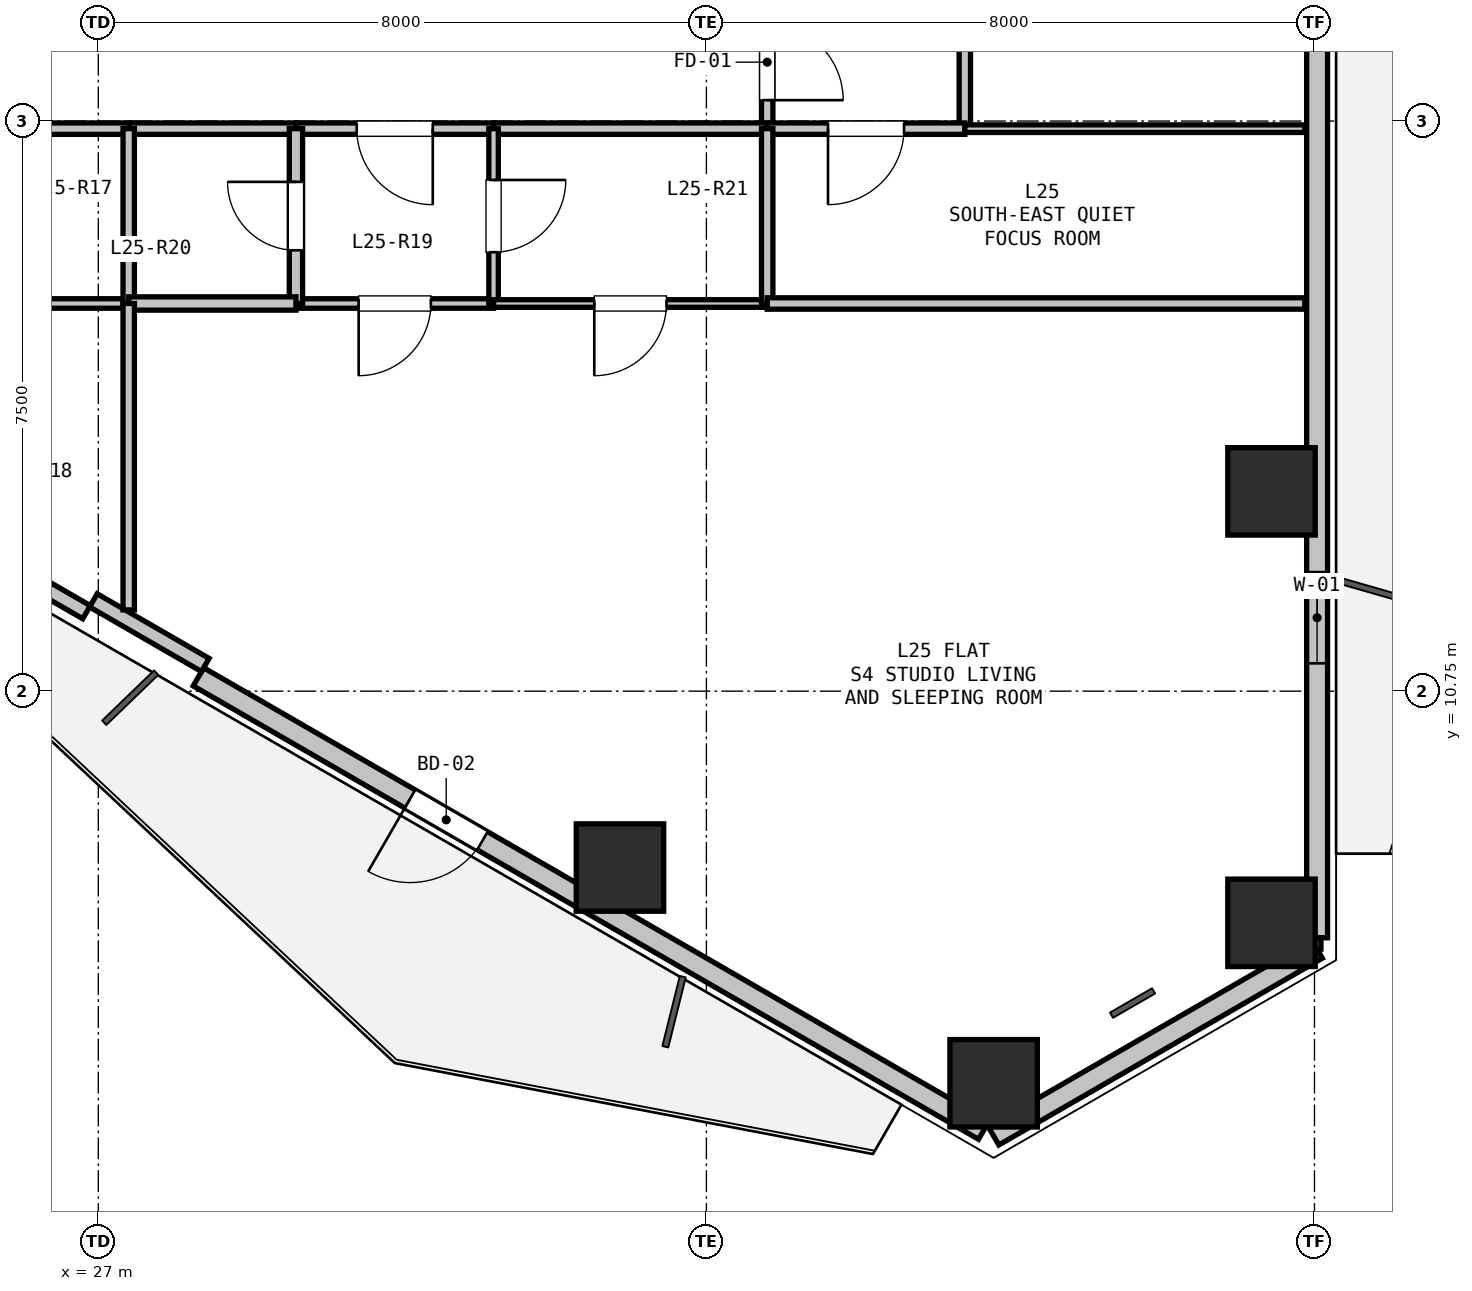
"""IFC4 building model, lengths in metres.
Left out: names, types, materials, properties, quantities, classifications, styles, units other than length and angle.
Written with IfcOpenShell. Run it as: python <this file> out.ifc"""

import sys

from ifc_helpers import new_model, si_unit, direction, frame, frame_2d, origin, origin_2d, place, context, subcontext, project, spatial, rectangle, hollow_rectangle, extrude, element, fill, save


model = new_model("IFC4")
c1 = context("Model", 3, precision=1e-05, world=origin(), true_north=direction((0.0, 1.0)))
c2 = subcontext(c1, "Body", "Model", "MODEL_VIEW")
j1 = project(units=[si_unit("LENGTHUNIT", "METRE"), si_unit("PLANEANGLEUNIT", "RADIAN")], contexts=[c1])
p1 = place(None, origin())
s1 = spatial("IfcSite", under=j1, at=p1, CompositionType="ELEMENT")
p2 = place(p1, origin())
s2 = spatial("IfcBuilding", under=s1, at=p2, CompositionType="ELEMENT")
p3 = place(p2, frame((0.0, 0.0, 93.3)))
s3 = spatial("IfcBuildingStorey", under=s2, at=p3, CompositionType="ELEMENT", Elevation=93.3)
for number, where, z_axis, x_axis in (
    (1, (42.435, 13.378, 0.0), (0.0, 0.0, 1.0), (1.0, 0.0, 0.0)),
    (2, (42.435, 7.702, 0.0), (0.0, 0.0, 1.0), (1.0, 0.0, 0.0)),
    (3, (38.779, 5.591, 0.0), (0.0, 0.0, 1.0), (1.0, 0.0, 0.0)),
    (4, (33.863, 8.429, 0.0), (0.0, 0.0, 1.0), (1.0, 0.0, 0.0)),
):
    element("IfcColumn", number, at=place(p3, frame(where, z_axis=z_axis, x_axis=x_axis)), inside=s3, PredefinedType="COLUMN", context=c2, shape_type="SweptSolid", body=[
        extrude(hollow_rectangle(XDim=1.15, YDim=1.15, WallThickness=0.032, at=origin_2d()), origin(), (0.0, 0.0, 1.0), 3.3),
    ])
p4 = place(p3, frame((43.035, 7.356, 0.0), z_axis=(0.0, 0.0, 1.0), x_axis=(-0.866011848704, -0.500023477353, 0.0)))
e5 = element("IfcWall", 5, at=p4, inside=s3, PredefinedType="SOLIDWALL", context=c2, shape_type="SweptSolid", body=[
    extrude(rectangle(XDim=4.914, YDim=0.275, at=frame_2d((2.457, 0.0))), origin(), (0.0, 0.0, 1.0), 2.67),
])
p5 = place(p3, frame((43.035, 19.435, 0.0), z_axis=(0.0, 0.0, 1.0), x_axis=(0.0, -1.0, 0.0)))
e6 = element("IfcWall", 6, at=p5, inside=s3, PredefinedType="SOLIDWALL", context=c2, shape_type="SweptSolid", body=[
    extrude(rectangle(XDim=11.93, YDim=0.275, at=frame_2d((5.965, 0.0))), origin(), (0.0, 0.0, 1.0), 2.67),
])
p6 = place(p5, frame((7.119, 0.0, 0.9)))
e7 = element("IfcOpeningElement", 7, at=p6, cuts=e6, PredefinedType="OPENING", context=c2, shape_type="SweptSolid", body=[
    extrude(rectangle(XDim=1.2, YDim=1.4, at=frame_2d((0.6, 0.7))), frame((0.0, 0.147, 0.0), z_axis=(0.0, -1.0, 0.0), x_axis=(1.0, 0.0, 0.0)), (0.0, 0.0, 1.0), 0.295),
])
p7 = place(p3, frame((38.649, 4.973, 0.0), z_axis=(0.0, 0.0, 1.0), x_axis=(-0.866023023012, 0.500004123596, 0.0)))
e8 = element("IfcWall", 8, at=p7, inside=s3, PredefinedType="SOLIDWALL", context=c2, shape_type="SweptSolid", body=[
    extrude(rectangle(XDim=11.93, YDim=0.275, at=frame_2d((5.965, 0.0))), origin(), (0.0, 0.0, 1.0), 2.67),
])
p8 = place(p7, frame((7.616, 0.0, 0.0)))
e9 = element("IfcOpeningElement", 9, at=p8, cuts=e8, PredefinedType="OPENING", context=c2, shape_type="SweptSolid", body=[
    extrude(rectangle(XDim=1.1, YDim=2.1, at=frame_2d((0.55, 1.05))), frame((0.0, 0.147, 0.0), z_axis=(0.0, -1.0, 0.0), x_axis=(1.0, 0.0, 0.0)), (0.0, 0.0, 1.0), 0.295),
])
p9 = place(p3, frame((26.845, 11.788, 0.0), z_axis=(0.0, 0.0, 1.0), x_axis=(-0.866027010039, 0.499997217876, 0.0)))
e10 = element("IfcWall", 10, at=p9, inside=s3, PredefinedType="PARAPET", context=c2, shape_type="SweptSolid", body=[
    extrude(rectangle(XDim=11.229, YDim=0.2, at=frame_2d((5.615, 0.0))), origin(), (0.0, 0.0, 1.0), 0.2),
])
p10 = place(p3, frame((28.407, 11.094, 0.0), z_axis=(0.0, 0.0, 1.0), x_axis=(-0.86605165483, 0.499954529098, 0.0)))
e11 = element("IfcWall", 11, at=p10, inside=s3, PredefinedType="PARAPET", context=c2, shape_type="SweptSolid", body=[
    extrude(rectangle(XDim=1.7, YDim=0.2, at=frame_2d((0.85, 0.0))), origin(), (0.0, 0.0, 1.0), 2.67),
])
p11 = place(p3, frame((35.8, 19.9, 0.0), z_axis=(0.0, 0.0, 1.0), x_axis=(0.0, -1.0, 0.0)))
e12 = element("IfcWall", 12, at=p11, inside=s3, PredefinedType="PARTITIONING", context=c2, shape_type="SweptSolid", body=[
    extrude(rectangle(XDim=1.75, YDim=0.15, at=frame_2d((0.875, 0.0))), origin(), (0.0, 0.0, 1.0), 3.05),
])
p12 = place(p11, frame((0.375, 0.0, 0.0)))
e13 = element("IfcOpeningElement", 13, at=p12, cuts=e12, PredefinedType="OPENING", context=c2, shape_type="SweptSolid", body=[
    extrude(rectangle(XDim=1.0, YDim=2.15, at=frame_2d((0.5, 1.075))), frame((0.0, 0.085, 0.0), z_axis=(0.0, -1.0, 0.0), x_axis=(1.0, 0.0, 0.0)), (0.0, 0.0, 1.0), 0.17),
])
p13 = place(p3, frame((35.8, 18.15, 0.0), z_axis=(0.0, 0.0, 1.0), x_axis=(-1.0, 0.0, 0.0)))
e14 = element("IfcWall", 14, at=p13, inside=s3, PredefinedType="PARTITIONING", context=c2, shape_type="SweptSolid", body=[
    extrude(rectangle(XDim=3.6, YDim=0.15, at=frame_2d((1.8, 0.0))), origin(), (0.0, 0.0, 1.0), 3.05),
])
p14 = place(p3, frame((32.2, 18.15, 0.0), z_axis=(0.0, 0.0, 1.0), x_axis=(-1.0, 0.0, 0.0)))
e15 = element("IfcWall", 15, at=p14, inside=s3, PredefinedType="PARTITIONING", context=c2, shape_type="SweptSolid", body=[
    extrude(rectangle(XDim=2.6, YDim=0.15, at=frame_2d((1.3, 0.0))), origin(), (0.0, 0.0, 1.0), 3.05),
])
p15 = place(p14, frame((0.8, 0.0, 0.0)))
e16 = element("IfcOpeningElement", 16, at=p15, cuts=e15, PredefinedType="OPENING", context=c2, shape_type="SweptSolid", body=[
    extrude(rectangle(XDim=1.0, YDim=2.15, at=frame_2d((0.5, 1.075))), frame((0.0, 0.085, 0.0), z_axis=(0.0, -1.0, 0.0), x_axis=(1.0, 0.0, 0.0)), (0.0, 0.0, 1.0), 0.17),
])
p16 = place(p3, frame((29.6, 18.15, 0.0), z_axis=(0.0, 0.0, 1.0), x_axis=(-1.0, 0.0, 0.0)))
e17 = element("IfcWall", 17, at=p16, inside=s3, PredefinedType="PARTITIONING", context=c2, shape_type="SweptSolid", body=[
    extrude(rectangle(XDim=2.2, YDim=0.15, at=frame_2d((1.1, 0.0))), origin(), (0.0, 0.0, 1.0), 3.05),
])
p17 = place(p3, frame((27.4, 18.15, 0.0), z_axis=(0.0, 0.0, 1.0), x_axis=(-1.0, 0.0, 0.0)))
e18 = element("IfcWall", 18, at=p17, inside=s3, PredefinedType="PARTITIONING", context=c2, shape_type="SweptSolid", body=[
    extrude(rectangle(XDim=3.2, YDim=0.15, at=frame_2d((1.6, 0.0))), origin(), (0.0, 0.0, 1.0), 2.423),
])
p18 = place(p3, frame((38.4, 26.75, 0.0), z_axis=(0.0, 0.0, 1.0), x_axis=(0.0, -1.0, 0.0)))
e19 = element("IfcWall", 19, at=p18, inside=s3, PredefinedType="PARTITIONING", context=c2, shape_type="SweptSolid", body=[
    extrude(rectangle(XDim=8.6, YDim=0.15, at=frame_2d((4.3, 0.0))), origin(), (0.0, 0.0, 1.0), 3.05),
])
p19 = place(p18, frame((3.8, 0.0, 0.0)))
e20 = element("IfcOpeningElement", 20, at=p19, cuts=e19, PredefinedType="OPENING", context=c2, shape_type="SweptSolid", body=[
    extrude(rectangle(XDim=1.0, YDim=2.15, at=frame_2d((0.5, 1.075))), frame((0.0, 0.085, 0.0), z_axis=(0.0, -1.0, 0.0), x_axis=(1.0, 0.0, 0.0)), (0.0, 0.0, 1.0), 0.17),
])
p20 = place(p3, frame((38.4, 18.15, 0.0), z_axis=(0.0, 0.0, 1.0), x_axis=(-1.0, 0.0, 0.0)))
e21 = element("IfcWall", 21, at=p20, inside=s3, PredefinedType="PARTITIONING", context=c2, shape_type="SweptSolid", body=[
    extrude(rectangle(XDim=2.6, YDim=0.15, at=frame_2d((1.3, 0.0))), origin(), (0.0, 0.0, 1.0), 2.423),
])
p21 = place(p20, frame((0.8, 0.0, 0.0)))
e22 = element("IfcOpeningElement", 22, at=p21, cuts=e21, PredefinedType="OPENING", context=c2, shape_type="SweptSolid", body=[
    extrude(rectangle(XDim=1.0, YDim=2.15, at=frame_2d((0.5, 1.075))), frame((0.0, 0.085, 0.0), z_axis=(0.0, -1.0, 0.0), x_axis=(1.0, 0.0, 0.0)), (0.0, 0.0, 1.0), 0.17),
])
p22 = place(p3, frame((32.2, 15.85, 0.0), z_axis=(0.0, 0.0, 1.0), x_axis=(-1.0, 0.0, 0.0)))
e23 = element("IfcWall", 23, at=p22, inside=s3, PredefinedType="PARTITIONING", context=c2, shape_type="SweptSolid", body=[
    extrude(rectangle(XDim=2.6, YDim=0.125, at=frame_2d((1.3, 0.0))), origin(), (0.0, 0.0, 1.0), 3.05),
])
p23 = place(p22, frame((0.825, 0.0, 0.0)))
e24 = element("IfcOpeningElement", 24, at=p23, cuts=e23, PredefinedType="OPENING", context=c2, shape_type="SweptSolid", body=[
    extrude(rectangle(XDim=0.95, YDim=2.1, at=frame_2d((0.475, 1.05))), frame((0.0, 0.073, 0.0), z_axis=(0.0, -1.0, 0.0), x_axis=(1.0, 0.0, 0.0)), (0.0, 0.0, 1.0), 0.145),
])
p24 = place(p3, frame((29.6, 15.85, 0.0), z_axis=(0.0, 0.0, 1.0), x_axis=(0.0, 1.0, 0.0)))
e25 = element("IfcWall", 25, at=p24, inside=s3, PredefinedType="PLUMBINGWALL", context=c2, shape_type="SweptSolid", body=[
    extrude(rectangle(XDim=2.3, YDim=0.175, at=frame_2d((1.15, 0.0))), origin(), (0.0, 0.0, 1.0), 3.05),
])
p25 = place(p24, frame((0.7, 0.0, 0.0)))
e26 = element("IfcOpeningElement", 26, at=p25, cuts=e25, PredefinedType="OPENING", context=c2, shape_type="SweptSolid", body=[
    extrude(rectangle(XDim=0.9, YDim=2.1, at=frame_2d((0.45, 1.05))), frame((0.0, 0.097, 0.0), z_axis=(0.0, -1.0, 0.0), x_axis=(1.0, 0.0, 0.0)), (0.0, 0.0, 1.0), 0.195),
])
p26 = place(p3, frame((32.2, 18.15, 0.0), z_axis=(0.0, 0.0, 1.0), x_axis=(0.0, -1.0, 0.0)))
e27 = element("IfcWall", 27, at=p26, inside=s3, PredefinedType="PARTITIONING", context=c2, shape_type="SweptSolid", body=[
    extrude(rectangle(XDim=2.3, YDim=0.125, at=frame_2d((1.15, 0.0))), origin(), (0.0, 0.0, 1.0), 3.05),
])
p27 = place(p26, frame((0.675, 0.0, 0.0)))
e28 = element("IfcOpeningElement", 28, at=p27, cuts=e27, PredefinedType="OPENING", context=c2, shape_type="SweptSolid", body=[
    extrude(rectangle(XDim=0.95, YDim=2.1, at=frame_2d((0.475, 1.05))), frame((0.0, 0.073, 0.0), z_axis=(0.0, -1.0, 0.0), x_axis=(1.0, 0.0, 0.0)), (0.0, 0.0, 1.0), 0.145),
])
p28 = place(p3, frame((27.4, 15.85, 0.0), z_axis=(0.0, 0.0, 1.0), x_axis=(-1.0, 0.0, 0.0)))
e29 = element("IfcWall", 29, at=p28, inside=s3, PredefinedType="PARTITIONING", context=c2, shape_type="SweptSolid", body=[
    extrude(rectangle(XDim=3.2, YDim=0.125, at=frame_2d((1.6, 0.0))), origin(), (0.0, 0.0, 1.0), 2.423),
])
p29 = place(p28, frame((1.125, 0.0, 0.0)))
e30 = element("IfcOpeningElement", 30, at=p29, cuts=e29, PredefinedType="OPENING", context=c2, shape_type="SweptSolid", body=[
    extrude(rectangle(XDim=0.95, YDim=2.1, at=frame_2d((0.475, 1.05))), frame((0.0, 0.073, 0.0), z_axis=(0.0, -1.0, 0.0), x_axis=(1.0, 0.0, 0.0)), (0.0, 0.0, 1.0), 0.145),
])
p30 = place(p3, frame((27.4, 18.15, 0.0), z_axis=(0.0, 0.0, 1.0), x_axis=(0.0, -1.0, 0.0)))
e31 = element("IfcWall", 31, at=p30, inside=s3, PredefinedType="PARTITIONING", context=c2, shape_type="SweptSolid", body=[
    extrude(rectangle(XDim=2.3, YDim=0.15, at=frame_2d((1.15, 0.0))), origin(), (0.0, 0.0, 1.0), 3.05),
])
p31 = place(p3, frame((29.6, 15.85, 0.0), z_axis=(0.0, 0.0, 1.0), x_axis=(-1.0, 0.0, 0.0)))
e32 = element("IfcWall", 32, at=p31, inside=s3, PredefinedType="PLUMBINGWALL", context=c2, shape_type="SweptSolid", body=[
    extrude(rectangle(XDim=2.2, YDim=0.175, at=frame_2d((1.1, 0.0))), origin(), (0.0, 0.0, 1.0), 3.05),
])
p32 = place(p3, frame((35.8, 15.85, 0.0), z_axis=(0.0, 0.0, 1.0), x_axis=(-1.0, 0.0, 0.0)))
e33 = element("IfcWall", 33, at=p32, inside=s3, PredefinedType="PARTITIONING", context=c2, shape_type="SweptSolid", body=[
    extrude(rectangle(XDim=3.6, YDim=0.1, at=frame_2d((1.8, 0.0))), origin(), (0.0, 0.0, 1.0), 3.05),
])
p33 = place(p32, frame((1.325, 0.0, 0.0)))
e34 = element("IfcOpeningElement", 34, at=p33, cuts=e33, PredefinedType="OPENING", context=c2, shape_type="SweptSolid", body=[
    extrude(rectangle(XDim=0.95, YDim=2.1, at=frame_2d((0.475, 1.05))), frame((0.0, 0.06, 0.0), z_axis=(0.0, -1.0, 0.0), x_axis=(1.0, 0.0, 0.0)), (0.0, 0.0, 1.0), 0.12),
])
p34 = place(p3, frame((35.8, 18.15, 0.0), z_axis=(0.0, 0.0, 1.0), x_axis=(0.0, -1.0, 0.0)))
e35 = element("IfcWall", 35, at=p34, inside=s3, PredefinedType="PARTITIONING", context=c2, shape_type="SweptSolid", body=[
    extrude(rectangle(XDim=2.3, YDim=0.15, at=frame_2d((1.15, 0.0))), origin(), (0.0, 0.0, 1.0), 3.05),
])
p35 = place(p3, frame((38.4, 18.15, 0.0), z_axis=(0.0, 0.0, 1.0), x_axis=(1.0, 0.0, 0.0)))
e36 = element("IfcWall", 36, at=p35, inside=s3, PredefinedType="PARTITIONING", context=c2, shape_type="SweptSolid", body=[
    extrude(rectangle(XDim=4.473, YDim=0.1, at=frame_2d((2.237, 0.0))), origin(), (0.0, 0.0, 1.0), 2.365),
])
p36 = place(p3, frame((42.873, 15.85, 0.0), z_axis=(0.0, 0.0, 1.0), x_axis=(-1.0, 0.0, 0.0)))
e37 = element("IfcWall", 37, at=p36, inside=s3, PredefinedType="PARTITIONING", context=c2, shape_type="SweptSolid", body=[
    extrude(rectangle(XDim=7.073, YDim=0.15, at=frame_2d((3.537, 0.0))), origin(), (0.0, 0.0, 1.0), 2.365),
])
p37 = place(p3, frame((27.4, 15.85, 0.0), z_axis=(0.0, 0.0, 1.0), x_axis=(0.0, -1.0, 0.0)))
e38 = element("IfcWall", 38, at=p37, inside=s3, PredefinedType="PARTITIONING", context=c2, shape_type="SweptSolid", body=[
    extrude(rectangle(XDim=4.031, YDim=0.15, at=frame_2d((2.016, 0.0))), origin(), (0.0, 0.0, 1.0), 2.365),
])
p38 = place(p3, frame((43.035, 7.506, 0.0), z_axis=(0.0, 0.0, 1.0), x_axis=(0.0, -1.0, 0.0)))
e39 = element("IfcWall", 39, at=p38, inside=s3, PredefinedType="PARTITIONING", context=c2, shape_type="SweptSolid", body=[
    extrude(rectangle(XDim=0.15, YDim=0.1, at=frame_2d((0.075, 0.0))), origin(), (0.0, 0.0, 1.0), 3.05),
])
p39 = place(p6, origin())
e40 = element("IfcWindow", 40, at=p39, inside=s3, PartitioningType="SINGLE_PANEL", PredefinedType="WINDOW", context=c2, shape_type="SweptSolid", body=[
    extrude(rectangle(XDim=1.2, YDim=1.4, at=frame_2d((0.6, 0.7))), frame((0.0, 0.03, 0.0), z_axis=(0.0, -1.0, 0.0), x_axis=(1.0, 0.0, 0.0)), (0.0, 0.0, 1.0), 0.06),
])
fill(e7, e40)
p40 = place(p8, origin())
e41 = element("IfcDoor", 41, at=p40, inside=s3, OperationType="SINGLE_SWING_RIGHT", PredefinedType="DOOR", context=c2, shape_type="SweptSolid", body=[
    extrude(rectangle(XDim=1.1, YDim=2.1, at=frame_2d((0.55, 1.05))), frame((0.0, 0.025, 0.0), z_axis=(0.0, -1.0, 0.0), x_axis=(1.0, 0.0, 0.0)), (0.0, 0.0, 1.0), 0.05),
])
fill(e9, e41)
p41 = place(p12, origin())
e42 = element("IfcDoor", 42, at=p41, inside=s3, OperationType="SINGLE_SWING_RIGHT", PredefinedType="DOOR", context=c2, shape_type="SweptSolid", body=[
    extrude(rectangle(XDim=1.0, YDim=2.15, at=frame_2d((0.5, 1.075))), frame((0.0, 0.025, 0.0), z_axis=(0.0, -1.0, 0.0), x_axis=(1.0, 0.0, 0.0)), (0.0, 0.0, 1.0), 0.05),
])
fill(e13, e42)
p42 = place(p15, origin())
e43 = element("IfcDoor", 43, at=p42, inside=s3, OperationType="SINGLE_SWING_LEFT", PredefinedType="DOOR", context=c2, shape_type="SweptSolid", body=[
    extrude(rectangle(XDim=1.0, YDim=2.15, at=frame_2d((0.5, 1.075))), frame((0.0, 0.025, 0.0), z_axis=(0.0, -1.0, 0.0), x_axis=(1.0, 0.0, 0.0)), (0.0, 0.0, 1.0), 0.05),
])
fill(e16, e43)
p43 = place(p21, origin())
e44 = element("IfcDoor", 44, at=p43, inside=s3, OperationType="SINGLE_SWING_RIGHT", PredefinedType="DOOR", context=c2, shape_type="SweptSolid", body=[
    extrude(rectangle(XDim=1.0, YDim=2.15, at=frame_2d((0.5, 1.075))), frame((0.0, 0.025, 0.0), z_axis=(0.0, -1.0, 0.0), x_axis=(1.0, 0.0, 0.0)), (0.0, 0.0, 1.0), 0.05),
])
fill(e22, e44)
p44 = place(p25, origin())
e45 = element("IfcDoor", 45, at=p44, inside=s3, OperationType="SINGLE_SWING_RIGHT", PredefinedType="DOOR", context=c2, shape_type="SweptSolid", body=[
    extrude(rectangle(XDim=0.9, YDim=2.1, at=frame_2d((0.45, 1.05))), frame((0.0, 0.025, 0.0), z_axis=(0.0, -1.0, 0.0), x_axis=(1.0, 0.0, 0.0)), (0.0, 0.0, 1.0), 0.05),
])
fill(e26, e45)
p45 = place(p27, origin())
e46 = element("IfcDoor", 46, at=p45, inside=s3, OperationType="SINGLE_SWING_LEFT", PredefinedType="DOOR", context=c2, shape_type="SweptSolid", body=[
    extrude(rectangle(XDim=0.95, YDim=2.1, at=frame_2d((0.475, 1.05))), frame((0.0, 0.025, 0.0), z_axis=(0.0, -1.0, 0.0), x_axis=(1.0, 0.0, 0.0)), (0.0, 0.0, 1.0), 0.05),
])
fill(e28, e46)
p46 = place(p23, origin())
e47 = element("IfcDoor", 47, at=p46, inside=s3, OperationType="SINGLE_SWING_RIGHT", PredefinedType="DOOR", context=c2, shape_type="SweptSolid", body=[
    extrude(rectangle(XDim=0.95, YDim=2.1, at=frame_2d((0.475, 1.05))), frame((0.0, 0.025, 0.0), z_axis=(0.0, -1.0, 0.0), x_axis=(1.0, 0.0, 0.0)), (0.0, 0.0, 1.0), 0.05),
])
fill(e24, e47)
p47 = place(p33, origin())
e48 = element("IfcDoor", 48, at=p47, inside=s3, OperationType="SINGLE_SWING_RIGHT", PredefinedType="DOOR", context=c2, shape_type="SweptSolid", body=[
    extrude(rectangle(XDim=0.95, YDim=2.1, at=frame_2d((0.475, 1.05))), frame((0.0, 0.025, 0.0), z_axis=(0.0, -1.0, 0.0), x_axis=(1.0, 0.0, 0.0)), (0.0, 0.0, 1.0), 0.05),
])
fill(e34, e48)
save(model, sys.argv[1])
